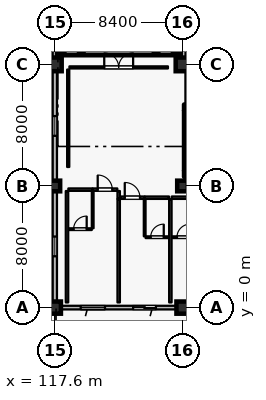
"""IFC4 building model, lengths in metres.
Left out: names, types, materials, properties, quantities, classifications, styles, units other than length and angle.
Written with IfcOpenShell. Run it as: python <this file> out.ifc"""

import sys

from ifc_helpers import new_model, si_unit, direction, frame, frame_2d, origin, origin_2d, place, context, subcontext, project, spatial, rectangle, hollow_rectangle, extrude, element, fill, save


model = new_model("IFC4")
c1 = context("Model", 3, precision=1e-05, world=origin(), true_north=direction((0.0, 1.0)))
c2 = subcontext(c1, "Body", "Model", "MODEL_VIEW")
j1 = project(units=[si_unit("LENGTHUNIT", "METRE"), si_unit("PLANEANGLEUNIT", "RADIAN")], contexts=[c1])
p1 = place(None, origin())
s1 = spatial("IfcSite", under=j1, at=p1, CompositionType="ELEMENT")
p2 = place(p1, origin())
s2 = spatial("IfcBuilding", under=s1, at=p2, CompositionType="ELEMENT")
p3 = place(p2, frame((0.0, 0.0, 21.0)))
s3 = spatial("IfcBuildingStorey", under=s2, at=p3, CompositionType="ELEMENT", Elevation=21.0)
p4 = place(p3, frame((117.6, 0.0, 0.0), z_axis=(0.0, 0.0, 1.0), x_axis=(1.0, 0.0, 0.0)))
e1 = element("IfcColumn", 1, at=p4, inside=s3, PredefinedType="COLUMN", context=c2, shape_type="SweptSolid", body=[
    extrude(rectangle(XDim=0.8, YDim=0.8, at=origin_2d()), origin(), (0.0, 0.0, 1.0), 4.2),
])
p5 = place(p3, frame((117.6, 16.0, 0.0), z_axis=(0.0, 0.0, 1.0), x_axis=(1.0, 0.0, 0.0)))
e2 = element("IfcColumn", 2, at=p5, inside=s3, PredefinedType="COLUMN", context=c2, shape_type="SweptSolid", body=[
    extrude(rectangle(XDim=0.9, YDim=0.9, at=origin_2d()), origin(), (0.0, 0.0, 1.0), 4.2),
])
p6 = place(p3, frame((126.0, 0.0, 0.0), z_axis=(0.0, 0.0, 1.0), x_axis=(1.0, 0.0, 0.0)))
e3 = element("IfcColumn", 3, at=p6, inside=s3, PredefinedType="COLUMN", context=c2, shape_type="SweptSolid", body=[
    extrude(rectangle(XDim=0.8, YDim=0.8, at=origin_2d()), origin(), (0.0, 0.0, 1.0), 4.2),
])
p7 = place(p3, frame((126.0, 16.0, 0.0), z_axis=(0.0, 0.0, 1.0), x_axis=(1.0, 0.0, 0.0)))
e4 = element("IfcColumn", 4, at=p7, inside=s3, PredefinedType="COLUMN", context=c2, shape_type="SweptSolid", body=[
    extrude(rectangle(XDim=0.9, YDim=0.9, at=origin_2d()), origin(), (0.0, 0.0, 1.0), 4.2),
])
for number, where, z_axis, x_axis in (
    (5, (117.6, 8.0, 0.0), (0.0, 0.0, 1.0), (1.0, 0.0, 0.0)),
    (6, (126.0, 8.0, 0.0), (0.0, 0.0, 1.0), (1.0, 0.0, 0.0)),
):
    element("IfcColumn", number, at=place(p3, frame(where, z_axis=z_axis, x_axis=x_axis)), inside=s3, PredefinedType="COLUMN", context=c2, shape_type="SweptSolid", body=[
        extrude(rectangle(XDim=0.7, YDim=0.7, at=origin_2d()), origin(), (0.0, 0.0, 1.0), 4.2),
    ])
p8 = place(p3, frame((125.6, 0.0, 0.0), z_axis=(0.0, 0.0, 1.0), x_axis=(-1.0, 0.0, 0.0)))
e7 = element("IfcWall", 7, at=p8, inside=s3, PredefinedType="SOLIDWALL", context=c2, shape_type="SweptSolid", body=[
    extrude(rectangle(XDim=7.6, YDim=0.24, at=frame_2d((3.8, 0.0))), origin(), (0.0, 0.0, 1.0), 3.53),
])
p9 = place(p8, frame((1.35, 0.0, 0.0)))
e8 = element("IfcOpeningElement", 8, at=p9, cuts=e7, PredefinedType="OPENING", context=c2, shape_type="SweptSolid", body=[
    extrude(rectangle(XDim=1.5, YDim=2.25, at=frame_2d((0.75, 1.125))), frame((0.0, 0.13, 0.0), z_axis=(0.0, -1.0, 0.0), x_axis=(1.0, 0.0, 0.0)), (0.0, 0.0, 1.0), 0.26),
])
p10 = place(p8, frame((4.7, 0.0, 0.8)))
e9 = element("IfcOpeningElement", 9, at=p10, cuts=e7, PredefinedType="OPENING", context=c2, shape_type="SweptSolid", body=[
    extrude(rectangle(XDim=1.6, YDim=1.6, at=frame_2d((0.8, 0.8))), frame((0.0, 0.13, 0.0), z_axis=(0.0, -1.0, 0.0), x_axis=(1.0, 0.0, 0.0)), (0.0, 0.0, 1.0), 0.26),
])
p11 = place(p3, frame((117.6, 0.4, 0.0), z_axis=(0.0, 0.0, 1.0), x_axis=(0.0, 1.0, 0.0)))
e10 = element("IfcWall", 10, at=p11, inside=s3, PredefinedType="SOLIDWALL", context=c2, shape_type="SweptSolid", body=[
    extrude(rectangle(XDim=7.25, YDim=0.28, at=frame_2d((3.625, 0.0))), origin(), (0.0, 0.0, 1.0), 3.3),
])
p12 = place(p11, frame((2.975, 0.0, 0.75)))
e11 = element("IfcOpeningElement", 11, at=p12, cuts=e10, PredefinedType="OPENING", context=c2, shape_type="SweptSolid", body=[
    extrude(rectangle(XDim=1.3, YDim=1.65, at=frame_2d((0.65, 0.825))), frame((0.0, 0.15, 0.0), z_axis=(0.0, -1.0, 0.0), x_axis=(1.0, 0.0, 0.0)), (0.0, 0.0, 1.0), 0.3),
])
p13 = place(p3, frame((117.6, 8.35, 0.0), z_axis=(0.0, 0.0, 1.0), x_axis=(0.0, 1.0, 0.0)))
e12 = element("IfcWall", 12, at=p13, inside=s3, PredefinedType="SOLIDWALL", context=c2, shape_type="SweptSolid", body=[
    extrude(rectangle(XDim=7.2, YDim=0.28, at=frame_2d((3.6, 0.0))), origin(), (0.0, 0.0, 1.0), 3.3),
])
p14 = place(p13, frame((2.95, 0.0, 0.75)))
e13 = element("IfcOpeningElement", 13, at=p14, cuts=e12, PredefinedType="OPENING", context=c2, shape_type="SweptSolid", body=[
    extrude(rectangle(XDim=1.3, YDim=1.65, at=frame_2d((0.65, 0.825))), frame((0.0, 0.15, 0.0), z_axis=(0.0, -1.0, 0.0), x_axis=(1.0, 0.0, 0.0)), (0.0, 0.0, 1.0), 0.3),
])
p15 = place(p3, frame((117.6, 16.45, 0.0), z_axis=(0.0, 0.0, 1.0), x_axis=(0.0, 1.0, 0.0)))
e14 = element("IfcWall", 14, at=p15, inside=s3, PredefinedType="SOLIDWALL", context=c2, shape_type="SweptSolid", body=[
    extrude(rectangle(XDim=7.2, YDim=0.28, at=frame_2d((3.6, 0.0))), origin(), (0.0, 0.0, 1.0), 3.3),
])
p16 = place(p15, frame((2.95, 0.0, 0.75)))
e15 = element("IfcOpeningElement", 15, at=p16, cuts=e14, PredefinedType="OPENING", context=c2, shape_type="SweptSolid", body=[
    extrude(rectangle(XDim=1.3, YDim=1.65, at=frame_2d((0.65, 0.825))), frame((0.0, 0.15, 0.0), z_axis=(0.0, -1.0, 0.0), x_axis=(1.0, 0.0, 0.0)), (0.0, 0.0, 1.0), 0.3),
])
p17 = place(p3, frame((126.1, 8.8, 0.0), z_axis=(0.0, 0.0, 1.0), x_axis=(1.0, 0.0, 0.0)))
e16 = element("IfcWall", 16, at=p17, inside=s3, PredefinedType="SHEAR", context=c2, shape_type="SweptSolid", body=[
    extrude(rectangle(XDim=8.2, YDim=0.4, at=frame_2d((4.1, 0.0))), origin(), (0.0, 0.0, 1.0), 3.965),
])
p18 = place(p3, frame((126.1, 13.16, 0.0), z_axis=(0.0, 0.0, 1.0), x_axis=(1.0, 0.0, 0.0)))
e17 = element("IfcWall", 17, at=p18, inside=s3, PredefinedType="SHEAR", context=c2, shape_type="SweptSolid", body=[
    extrude(rectangle(XDim=8.2, YDim=0.4, at=frame_2d((4.1, 0.0))), origin(), (0.0, 0.0, 1.0), 3.965),
])
p19 = place(p18, frame((0.43, 0.0, 0.0)))
e18 = element("IfcOpeningElement", 18, at=p19, cuts=e17, PredefinedType="OPENING", context=c2, shape_type="SweptSolid", body=[
    extrude(rectangle(XDim=1.16, YDim=2.2, at=frame_2d((0.58, 1.1))), frame((0.0, 0.21, 0.0), z_axis=(0.0, -1.0, 0.0), x_axis=(1.0, 0.0, 0.0)), (0.0, 0.0, 1.0), 0.42),
])
p20 = place(p3, frame((126.3, 9.005, 0.0), z_axis=(0.0, 0.0, 1.0), x_axis=(0.0, 1.0, 0.0)))
e19 = element("IfcWall", 19, at=p20, inside=s3, PredefinedType="SHEAR", context=c2, shape_type="SweptSolid", body=[
    extrude(rectangle(XDim=3.95, YDim=0.4, at=frame_2d((1.975, 0.0))), origin(), (0.0, 0.0, 1.0), 3.965),
])
p21 = place(p3, frame((126.3, 13.365, 0.0), z_axis=(0.0, 0.0, 1.0), x_axis=(0.0, 1.0, 0.0)))
e20 = element("IfcWall", 20, at=p21, inside=s3, PredefinedType="PARTITIONING", context=c2, shape_type="SweptSolid", body=[
    extrude(rectangle(XDim=5.82, YDim=0.22, at=frame_2d((2.91, 0.0))), origin(), (0.0, 0.0, 1.0), 3.965),
])
p22 = place(p3, frame((117.75, 16.8, 0.0), z_axis=(0.0, 0.0, 1.0), x_axis=(1.0, 0.0, 0.0)))
e21 = element("IfcWall", 21, at=p22, inside=s3, PredefinedType="SHEAR", context=c2, shape_type="SweptSolid", body=[
    extrude(rectangle(XDim=8.15, YDim=0.4, at=frame_2d((4.075, 0.0))), origin(), (0.0, 0.0, 1.0), 3.965),
])
for number, where, z_axis, x_axis in (
    (22, (118.08, 16.8, 0.0), (0.0, 0.0, 1.0), (1.0, 0.0, 0.0)),
    (23, (119.34, 16.8, 0.0), (0.0, 0.0, 1.0), (1.0, 0.0, 0.0)),
):
    element("IfcColumn", number, at=place(p3, frame(where, z_axis=z_axis, x_axis=x_axis)), inside=s3, PredefinedType="COLUMN", context=c2, shape_type="SweptSolid", body=[
        extrude(hollow_rectangle(XDim=0.3, YDim=0.3, WallThickness=0.012, at=origin_2d()), origin(), (0.0, 0.0, 1.0), 4.02),
    ])
for number, where, z_axis, x_axis in (
    (24, (124.26, 16.8, -2.4), (0.0, 0.0, 1.0), (1.0, 0.0, 0.0)),
    (25, (125.52, 16.8, -2.4), (0.0, 0.0, 1.0), (1.0, 0.0, 0.0)),
):
    element("IfcColumn", number, at=place(p3, frame(where, z_axis=z_axis, x_axis=x_axis)), inside=s3, PredefinedType="COLUMN", context=c2, shape_type="SweptSolid", body=[
        extrude(hollow_rectangle(XDim=0.3, YDim=0.3, WallThickness=0.012, at=origin_2d()), origin(), (0.0, 0.0, 1.0), 4.32),
    ])
p23 = place(p3, frame((118.49, 7.76, 0.0), z_axis=(0.0, 0.0, 1.0), x_axis=(1.0, 0.0, 0.0)))
e26 = element("IfcWall", 26, at=p23, inside=s3, PredefinedType="PARTITIONING", context=c2, shape_type="SweptSolid", body=[
    extrude(rectangle(XDim=1.59, YDim=0.16, at=frame_2d((0.795, 0.0))), origin(), (0.0, 0.0, 1.0), 3.965),
])
p24 = place(p3, frame((120.09, 7.76, 0.0), z_axis=(0.0, 0.0, 1.0), x_axis=(1.0, 0.0, 0.0)))
e27 = element("IfcWall", 27, at=p24, inside=s3, PredefinedType="PARTITIONING", context=c2, shape_type="SweptSolid", body=[
    extrude(rectangle(XDim=1.62, YDim=0.16, at=frame_2d((0.81, 0.0))), origin(), (0.0, 0.0, 1.0), 3.965),
])
p25 = place(p24, frame((0.33, 0.0, 0.0)))
e28 = element("IfcOpeningElement", 28, at=p25, cuts=e27, PredefinedType="OPENING", context=c2, shape_type="SweptSolid", body=[
    extrude(rectangle(XDim=0.96, YDim=2.2, at=frame_2d((0.48, 1.1))), frame((0.0, 0.09, 0.0), z_axis=(0.0, -1.0, 0.0), x_axis=(1.0, 0.0, 0.0)), (0.0, 0.0, 1.0), 0.18),
])
p26 = place(p3, frame((120.09, 5.22, 0.0), z_axis=(0.0, 0.0, 1.0), x_axis=(0.0, 1.0, 0.0)))
e29 = element("IfcWall", 29, at=p26, inside=s3, PredefinedType="PARTITIONING", context=c2, shape_type="SweptSolid", body=[
    extrude(rectangle(XDim=2.45, YDim=0.115, at=frame_2d((1.225, 0.0))), origin(), (0.0, 0.0, 1.0), 3.965),
])
p27 = place(p3, frame((118.5, 5.16, 0.0), z_axis=(0.0, 0.0, 1.0), x_axis=(1.0, 0.0, 0.0)))
e30 = element("IfcWall", 30, at=p27, inside=s3, PredefinedType="PARTITIONING", context=c2, shape_type="SweptSolid", body=[
    extrude(rectangle(XDim=1.53, YDim=0.115, at=frame_2d((0.765, 0.0))), origin(), (0.0, 0.0, 1.0), 3.965),
])
p28 = place(p27, frame((0.335, 0.0, 0.0)))
e31 = element("IfcOpeningElement", 31, at=p28, cuts=e30, PredefinedType="OPENING", context=c2, shape_type="SweptSolid", body=[
    extrude(rectangle(XDim=0.86, YDim=2.12, at=frame_2d((0.43, 1.06))), frame((0.0, 0.067, 0.0), z_axis=(0.0, -1.0, 0.0), x_axis=(1.0, 0.0, 0.0)), (0.0, 0.0, 1.0), 0.135),
])
p29 = place(p3, frame((118.4, 0.34, 0.0), z_axis=(0.0, 0.0, 1.0), x_axis=(0.0, 1.0, 0.0)))
e32 = element("IfcWall", 32, at=p29, inside=s3, PredefinedType="PARTITIONING", context=c2, shape_type="SweptSolid", body=[
    extrude(rectangle(XDim=7.33, YDim=0.16, at=frame_2d((3.665, 0.0))), origin(), (0.0, 0.0, 1.0), 3.965),
])
p30 = place(p3, frame((121.8, 7.15, 0.0), z_axis=(0.0, 0.0, 1.0), x_axis=(0.0, 1.0, 0.0)))
e33 = element("IfcWall", 33, at=p30, inside=s3, PredefinedType="PARTITIONING", context=c2, shape_type="SweptSolid", body=[
    extrude(rectangle(XDim=0.52, YDim=0.16, at=frame_2d((0.26, 0.0))), origin(), (0.0, 0.0, 1.0), 3.965),
])
p31 = place(p3, frame((121.89, 7.23, 0.0), z_axis=(0.0, 0.0, 1.0), x_axis=(1.0, 0.0, 0.0)))
e34 = element("IfcWall", 34, at=p31, inside=s3, PredefinedType="PARTITIONING", context=c2, shape_type="SweptSolid", body=[
    extrude(rectangle(XDim=1.62, YDim=0.16, at=frame_2d((0.81, 0.0))), origin(), (0.0, 0.0, 1.0), 3.965),
])
p32 = place(p31, frame((0.31, 0.0, 0.0)))
e35 = element("IfcOpeningElement", 35, at=p32, cuts=e34, PredefinedType="OPENING", context=c2, shape_type="SweptSolid", body=[
    extrude(rectangle(XDim=1.0, YDim=2.25, at=frame_2d((0.5, 1.125))), frame((0.0, 0.09, 0.0), z_axis=(0.0, -1.0, 0.0), x_axis=(1.0, 0.0, 0.0)), (0.0, 0.0, 1.0), 0.18),
])
p33 = place(p3, frame((123.52, 7.23, 0.0), z_axis=(0.0, 0.0, 1.0), x_axis=(1.0, 0.0, 0.0)))
e36 = element("IfcWall", 36, at=p33, inside=s3, PredefinedType="PARTITIONING", context=c2, shape_type="SweptSolid", body=[
    extrude(rectangle(XDim=1.59, YDim=0.16, at=frame_2d((0.795, 0.0))), origin(), (0.0, 0.0, 1.0), 3.965),
])
p34 = place(p3, frame((123.51, 4.69, 0.0), z_axis=(0.0, 0.0, 1.0), x_axis=(0.0, 1.0, 0.0)))
e37 = element("IfcWall", 37, at=p34, inside=s3, PredefinedType="PARTITIONING", context=c2, shape_type="SweptSolid", body=[
    extrude(rectangle(XDim=2.45, YDim=0.115, at=frame_2d((1.225, 0.0))), origin(), (0.0, 0.0, 1.0), 3.965),
])
p35 = place(p3, frame((123.57, 4.63, 0.0), z_axis=(0.0, 0.0, 1.0), x_axis=(1.0, 0.0, 0.0)))
e38 = element("IfcWall", 38, at=p35, inside=s3, PredefinedType="PARTITIONING", context=c2, shape_type="SweptSolid", body=[
    extrude(rectangle(XDim=1.53, YDim=0.115, at=frame_2d((0.765, 0.0))), origin(), (0.0, 0.0, 1.0), 3.965),
])
p36 = place(p35, frame((0.335, 0.0, 0.0)))
e39 = element("IfcOpeningElement", 39, at=p36, cuts=e38, PredefinedType="OPENING", context=c2, shape_type="SweptSolid", body=[
    extrude(rectangle(XDim=0.86, YDim=2.12, at=frame_2d((0.43, 1.06))), frame((0.0, 0.067, 0.0), z_axis=(0.0, -1.0, 0.0), x_axis=(1.0, 0.0, 0.0)), (0.0, 0.0, 1.0), 0.135),
])
p37 = place(p3, frame((121.8, 0.34, 0.0), z_axis=(0.0, 0.0, 1.0), x_axis=(0.0, 1.0, 0.0)))
e40 = element("IfcWall", 40, at=p37, inside=s3, PredefinedType="PARTITIONING", context=c2, shape_type="SweptSolid", body=[
    extrude(rectangle(XDim=6.8, YDim=0.16, at=frame_2d((3.4, 0.0))), origin(), (0.0, 0.0, 1.0), 3.965),
])
p38 = place(p3, frame((125.29, 7.23, 0.0), z_axis=(0.0, 0.0, 1.0), x_axis=(1.0, 0.0, 0.0)))
e41 = element("IfcWall", 41, at=p38, inside=s3, PredefinedType="PARTITIONING", context=c2, shape_type="SweptSolid", body=[
    extrude(rectangle(XDim=1.59, YDim=0.16, at=frame_2d((0.795, 0.0))), origin(), (0.0, 0.0, 1.0), 3.965),
])
p39 = place(p3, frame((125.3, 4.63, 0.0), z_axis=(0.0, 0.0, 1.0), x_axis=(1.0, 0.0, 0.0)))
e42 = element("IfcWall", 42, at=p39, inside=s3, PredefinedType="PARTITIONING", context=c2, shape_type="SweptSolid", body=[
    extrude(rectangle(XDim=1.53, YDim=0.115, at=frame_2d((0.765, 0.0))), origin(), (0.0, 0.0, 1.0), 3.965),
])
p40 = place(p39, frame((0.335, 0.0, 0.0)))
e43 = element("IfcOpeningElement", 43, at=p40, cuts=e42, PredefinedType="OPENING", context=c2, shape_type="SweptSolid", body=[
    extrude(rectangle(XDim=0.86, YDim=2.12, at=frame_2d((0.43, 1.06))), frame((0.0, 0.067, 0.0), z_axis=(0.0, -1.0, 0.0), x_axis=(1.0, 0.0, 0.0)), (0.0, 0.0, 1.0), 0.135),
])
p41 = place(p3, frame((125.2, 0.34, 0.0), z_axis=(0.0, 0.0, 1.0), x_axis=(0.0, 1.0, 0.0)))
e44 = element("IfcWall", 44, at=p41, inside=s3, PredefinedType="PARTITIONING", context=c2, shape_type="SweptSolid", body=[
    extrude(rectangle(XDim=6.8, YDim=0.16, at=frame_2d((3.4, 0.0))), origin(), (0.0, 0.0, 1.0), 3.965),
])
p42 = place(p3, frame((118.56, 15.8, 0.0), z_axis=(0.0, 0.0, 1.0), x_axis=(1.0, 0.0, 0.0)))
e45 = element("IfcWall", 45, at=p42, inside=s3, PredefinedType="PARTITIONING", context=c2, shape_type="SweptSolid", body=[
    extrude(rectangle(XDim=6.48, YDim=0.14, at=frame_2d((3.24, 0.0))), origin(), (0.0, 0.0, 1.0), 3.965),
])
p43 = place(p42, frame((2.29, 0.0, 0.0)))
e46 = element("IfcOpeningElement", 46, at=p43, cuts=e45, PredefinedType="OPENING", context=c2, shape_type="SweptSolid", body=[
    extrude(rectangle(XDim=1.9, YDim=2.4, at=frame_2d((0.95, 1.2))), frame((0.0, 0.08, 0.0), z_axis=(0.0, -1.0, 0.0), x_axis=(1.0, 0.0, 0.0)), (0.0, 0.0, 1.0), 0.16),
])
p44 = place(p3, frame((118.48, 9.25, 0.0), z_axis=(0.0, 0.0, 1.0), x_axis=(0.0, 1.0, 0.0)))
e47 = element("IfcWall", 47, at=p44, inside=s3, PredefinedType="PARTITIONING", context=c2, shape_type="SweptSolid", body=[
    extrude(rectangle(XDim=6.41, YDim=0.14, at=frame_2d((3.205, 0.0))), origin(), (0.0, 0.0, 1.0), 3.965),
])
p45 = place(p9, origin())
e48 = element("IfcDoor", 48, at=p45, inside=s3, OperationType="SLIDING_TO_LEFT", PredefinedType="DOOR", context=c2, shape_type="SweptSolid", body=[
    extrude(rectangle(XDim=1.5, YDim=2.25, at=frame_2d((0.75, 1.125))), frame((0.0, 0.025, 0.0), z_axis=(0.0, -1.0, 0.0), x_axis=(1.0, 0.0, 0.0)), (0.0, 0.0, 1.0), 0.05),
])
fill(e8, e48)
p46 = place(p10, origin())
e49 = element("IfcWindow", 49, at=p46, inside=s3, PartitioningType="SINGLE_PANEL", PredefinedType="WINDOW", context=c2, shape_type="SweptSolid", body=[
    extrude(rectangle(XDim=1.6, YDim=1.6, at=frame_2d((0.8, 0.8))), frame((0.0, 0.03, 0.0), z_axis=(0.0, -1.0, 0.0), x_axis=(1.0, 0.0, 0.0)), (0.0, 0.0, 1.0), 0.06),
])
fill(e9, e49)
p47 = place(p12, origin())
e50 = element("IfcWindow", 50, at=p47, inside=s3, PartitioningType="SINGLE_PANEL", PredefinedType="WINDOW", context=c2, shape_type="SweptSolid", body=[
    extrude(rectangle(XDim=1.3, YDim=1.65, at=frame_2d((0.65, 0.825))), frame((0.0, 0.03, 0.0), z_axis=(0.0, -1.0, 0.0), x_axis=(1.0, 0.0, 0.0)), (0.0, 0.0, 1.0), 0.06),
])
fill(e11, e50)
p48 = place(p14, origin())
e51 = element("IfcWindow", 51, at=p48, inside=s3, PartitioningType="SINGLE_PANEL", PredefinedType="WINDOW", context=c2, shape_type="SweptSolid", body=[
    extrude(rectangle(XDim=1.3, YDim=1.65, at=frame_2d((0.65, 0.825))), frame((0.0, 0.03, 0.0), z_axis=(0.0, -1.0, 0.0), x_axis=(1.0, 0.0, 0.0)), (0.0, 0.0, 1.0), 0.06),
])
fill(e13, e51)
p49 = place(p25, origin())
e52 = element("IfcDoor", 52, at=p49, inside=s3, OperationType="SINGLE_SWING_LEFT", PredefinedType="DOOR", context=c2, shape_type="SweptSolid", body=[
    extrude(rectangle(XDim=0.96, YDim=2.2, at=frame_2d((0.48, 1.1))), frame((0.0, 0.025, 0.0), z_axis=(0.0, -1.0, 0.0), x_axis=(1.0, 0.0, 0.0)), (0.0, 0.0, 1.0), 0.05),
])
fill(e28, e52)
p50 = place(p28, origin())
e53 = element("IfcDoor", 53, at=p50, inside=s3, OperationType="SINGLE_SWING_RIGHT", PredefinedType="DOOR", context=c2, shape_type="SweptSolid", body=[
    extrude(rectangle(XDim=0.86, YDim=2.12, at=frame_2d((0.43, 1.06))), frame((0.0, 0.025, 0.0), z_axis=(0.0, -1.0, 0.0), x_axis=(1.0, 0.0, 0.0)), (0.0, 0.0, 1.0), 0.05),
])
fill(e31, e53)
p51 = place(p32, origin())
e54 = element("IfcDoor", 54, at=p51, inside=s3, OperationType="SINGLE_SWING_LEFT", PredefinedType="DOOR", context=c2, shape_type="SweptSolid", body=[
    extrude(rectangle(XDim=1.0, YDim=2.25, at=frame_2d((0.5, 1.125))), frame((0.0, 0.025, 0.0), z_axis=(0.0, -1.0, 0.0), x_axis=(1.0, 0.0, 0.0)), (0.0, 0.0, 1.0), 0.05),
])
fill(e35, e54)
p52 = place(p36, origin())
e55 = element("IfcDoor", 55, at=p52, inside=s3, OperationType="SINGLE_SWING_RIGHT", PredefinedType="DOOR", context=c2, shape_type="SweptSolid", body=[
    extrude(rectangle(XDim=0.86, YDim=2.12, at=frame_2d((0.43, 1.06))), frame((0.0, 0.025, 0.0), z_axis=(0.0, -1.0, 0.0), x_axis=(1.0, 0.0, 0.0)), (0.0, 0.0, 1.0), 0.05),
])
fill(e39, e55)
p53 = place(p40, origin())
e56 = element("IfcDoor", 56, at=p53, inside=s3, OperationType="SINGLE_SWING_RIGHT", PredefinedType="DOOR", context=c2, shape_type="SweptSolid", body=[
    extrude(rectangle(XDim=0.86, YDim=2.12, at=frame_2d((0.43, 1.06))), frame((0.0, 0.025, 0.0), z_axis=(0.0, -1.0, 0.0), x_axis=(1.0, 0.0, 0.0)), (0.0, 0.0, 1.0), 0.05),
])
fill(e43, e56)
p54 = place(p43, origin())
e57 = element("IfcDoor", 57, at=p54, inside=s3, OperationType="DOUBLE_DOOR_SINGLE_SWING", PredefinedType="DOOR", context=c2, shape_type="SweptSolid", body=[
    extrude(rectangle(XDim=1.9, YDim=2.4, at=frame_2d((0.95, 1.2))), frame((0.0, 0.025, 0.0), z_axis=(0.0, -1.0, 0.0), x_axis=(1.0, 0.0, 0.0)), (0.0, 0.0, 1.0), 0.05),
])
fill(e46, e57)
save(model, sys.argv[1])
